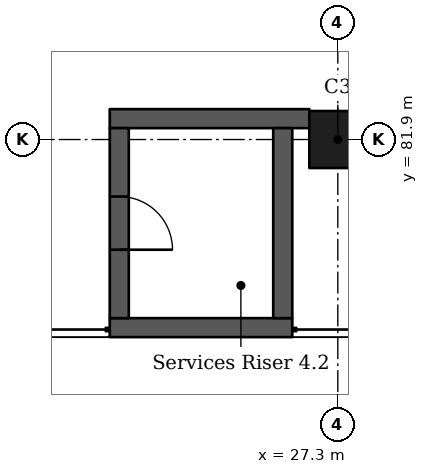
"""IFC4 building model, lengths in metres.
Left out: names, types, materials, properties, quantities, classifications, styles, units other than length and angle.
Written with IfcOpenShell. Run it as: python <this file> out.ifc"""

import sys

from ifc_helpers import new_model, si_unit, direction, frame, frame_2d, origin, origin_2d, place, context, subcontext, project, spatial, rectangle, extrude, element, fill, save


model = new_model("IFC4")
c1 = context("Model", 3, precision=1e-05, world=origin(), true_north=direction((0.0, 1.0)))
c2 = subcontext(c1, "Body", "Model", "MODEL_VIEW")
j1 = project(units=[si_unit("LENGTHUNIT", "METRE"), si_unit("PLANEANGLEUNIT", "RADIAN")], contexts=[c1])
p1 = place(None, origin())
s1 = spatial("IfcSite", under=j1, at=p1, CompositionType="ELEMENT")
p2 = place(p1, origin())
s2 = spatial("IfcBuilding", under=s1, at=p2, CompositionType="ELEMENT")
p3 = place(p2, frame((0.0, 0.0, 10.92)))
s3 = spatial("IfcBuildingStorey", under=s2, at=p3, CompositionType="ELEMENT", Elevation=10.92)
p4 = place(p3, frame((27.3, 81.9, 0.0), z_axis=(0.0, 0.0, 1.0), x_axis=(1.0, 0.0, 0.0)))
e1 = element("IfcColumn", 1, at=p4, inside=s3, PredefinedType="COLUMN", context=c2, shape_type="SweptSolid", body=[
    extrude(rectangle(XDim=0.75, YDim=0.75, at=origin_2d()), origin(), (0.0, 0.0, 1.0), 4.55),
])
p5 = place(p3, frame((26.7, 79.425, 0.0), z_axis=(0.0, 0.0, 1.0), x_axis=(-1.0, 0.0, 0.0)))
e2 = element("IfcWall", 2, at=p5, inside=s3, PredefinedType="SHEAR", context=c2, shape_type="SweptSolid", body=[
    extrude(rectangle(XDim=2.4, YDim=0.25, at=frame_2d((1.2, 0.0))), origin(), (0.0, 0.0, 1.0), 4.55),
])
p6 = place(p3, frame((26.925, 82.175, 0.0), z_axis=(0.0, 0.0, 1.0), x_axis=(-1.0, 0.0, 0.0)))
e3 = element("IfcWall", 3, at=p6, inside=s3, PredefinedType="SHEAR", context=c2, shape_type="SweptSolid", body=[
    extrude(rectangle(XDim=2.625, YDim=0.25, at=frame_2d((1.312, 0.0))), origin(), (0.0, 0.0, 1.0), 4.55),
])
p7 = place(p3, frame((24.425, 82.05, 0.0), z_axis=(0.0, 0.0, 1.0), x_axis=(0.0, -1.0, 0.0)))
e4 = element("IfcWall", 4, at=p7, inside=s3, PredefinedType="SHEAR", context=c2, shape_type="SweptSolid", body=[
    extrude(rectangle(XDim=2.5, YDim=0.25, at=frame_2d((1.25, 0.0))), origin(), (0.0, 0.0, 1.0), 4.55),
])
p8 = place(p7, frame((0.9, 0.0, 0.0)))
e5 = element("IfcOpeningElement", 5, at=p8, cuts=e4, PredefinedType="OPENING", context=c2, shape_type="SweptSolid", body=[
    extrude(rectangle(XDim=0.7, YDim=2.1, at=frame_2d((0.35, 1.05))), frame((0.0, 0.135, 0.0), z_axis=(0.0, -1.0, 0.0), x_axis=(1.0, 0.0, 0.0)), (0.0, 0.0, 1.0), 0.27),
])
p9 = place(p3, frame((26.575, 82.05, 0.0), z_axis=(0.0, 0.0, 1.0), x_axis=(0.0, -1.0, 0.0)))
e6 = element("IfcWall", 6, at=p9, inside=s3, PredefinedType="SHEAR", context=c2, shape_type="SweptSolid", body=[
    extrude(rectangle(XDim=2.5, YDim=0.25, at=frame_2d((1.25, 0.0))), origin(), (0.0, 0.0, 1.0), 4.55),
])
p10 = place(p8, origin())
e7 = element("IfcDoor", 7, at=p10, inside=s3, OperationType="SINGLE_SWING_LEFT", PredefinedType="DOOR", context=c2, shape_type="SweptSolid", body=[
    extrude(rectangle(XDim=0.7, YDim=2.1, at=frame_2d((0.35, 1.05))), frame((0.0, 0.025, 0.0), z_axis=(0.0, -1.0, 0.0), x_axis=(1.0, 0.0, 0.0)), (0.0, 0.0, 1.0), 0.05),
])
fill(e5, e7)
save(model, sys.argv[1])
